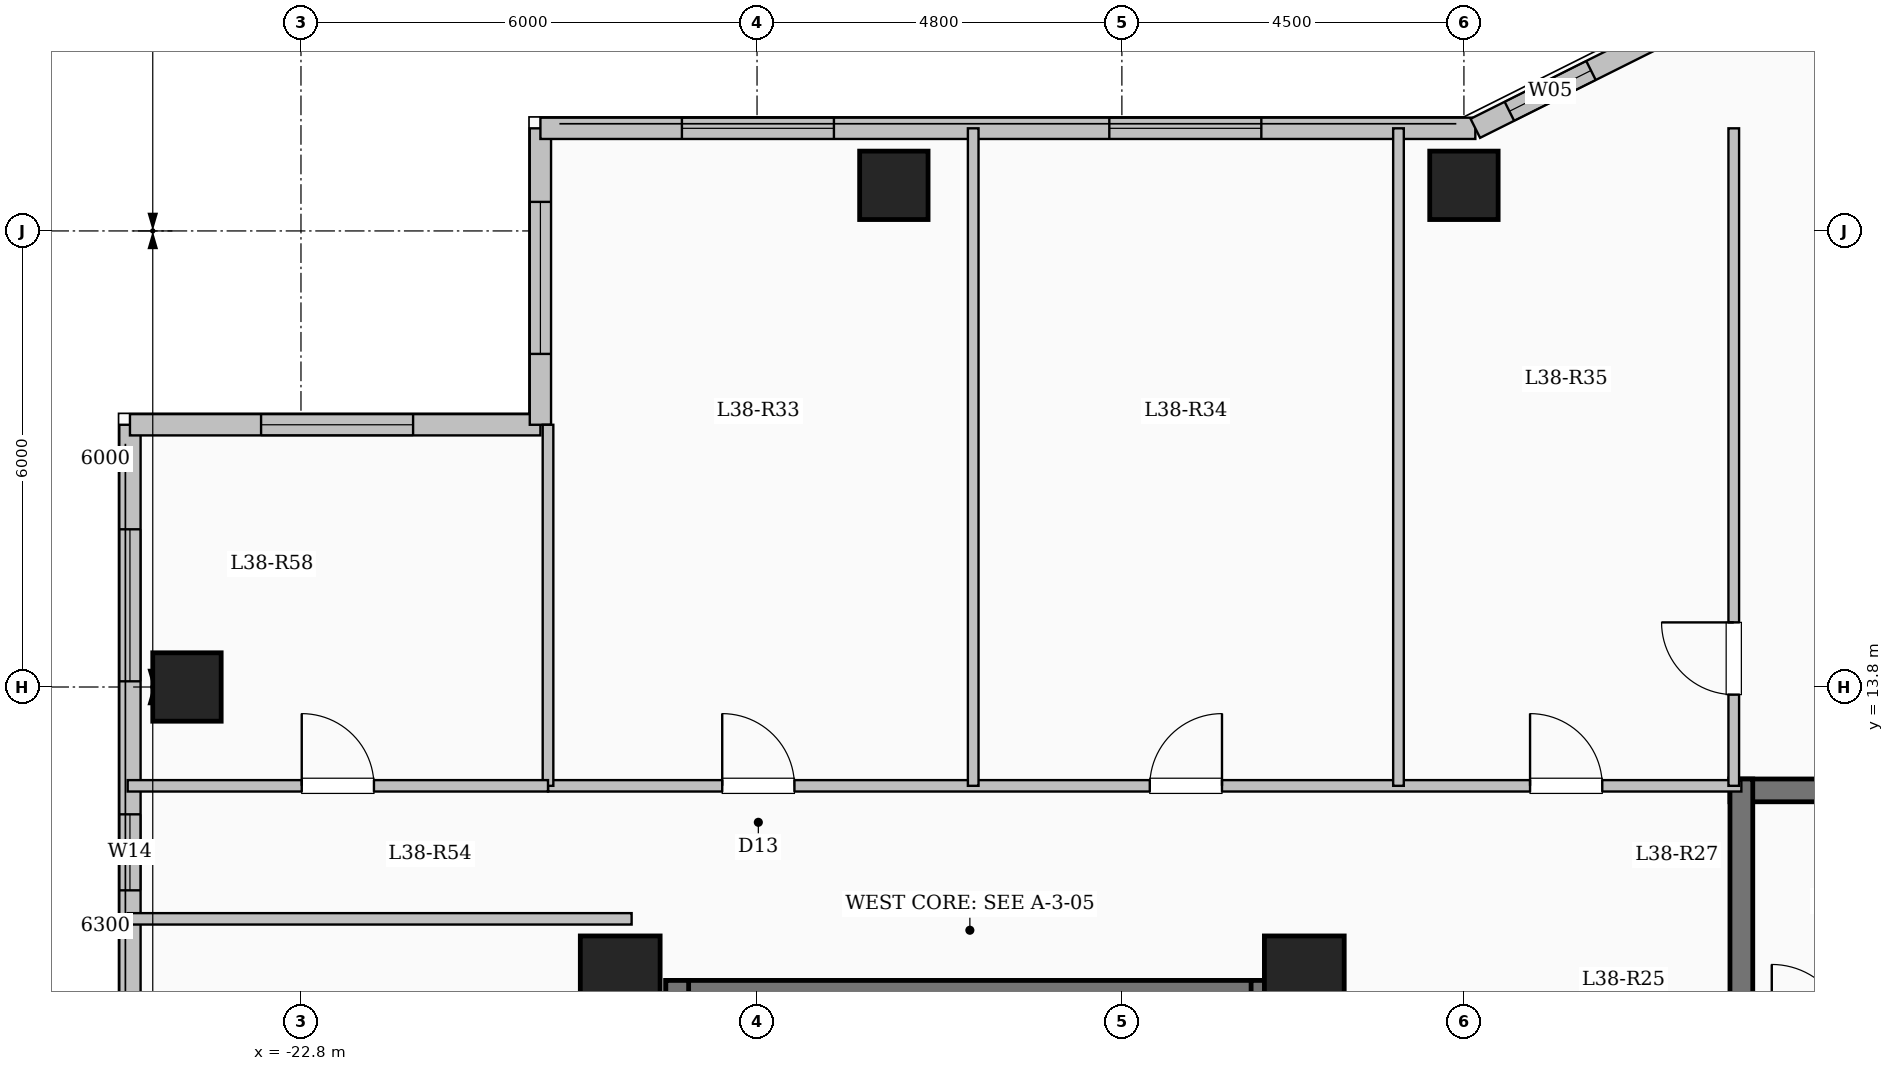
"""IFC4 building model, lengths in metres.
Left out: names, types, materials, properties, quantities, classifications, styles, units other than length and angle.
Written with IfcOpenShell. Run it as: python <this file> out.ifc"""

import sys

from ifc_helpers import new_model, si_unit, direction, frame, frame_2d, origin, origin_2d, place, context, subcontext, project, spatial, rectangle, extrude, element, fill, save


model = new_model("IFC4")
c1 = context("Model", 3, precision=1e-05, world=origin(), true_north=direction((0.0, 1.0)))
c2 = subcontext(c1, "Body", "Model", "MODEL_VIEW")
j1 = project(units=[si_unit("LENGTHUNIT", "METRE"), si_unit("PLANEANGLEUNIT", "RADIAN")], contexts=[c1])
p1 = place(None, origin())
s1 = spatial("IfcSite", under=j1, at=p1, CompositionType="ELEMENT")
p2 = place(p1, origin())
s2 = spatial("IfcBuilding", under=s1, at=p2, CompositionType="ELEMENT")
p3 = place(p2, frame((0.0, 0.0, 142.65)))
s3 = spatial("IfcBuildingStorey", under=s2, at=p3, CompositionType="ELEMENT", Elevation=142.65)
for number, where, z_axis, x_axis in (
    (1, (-9.6, 10.0, 0.0), (0.0, 0.0, 1.0), (1.0, 0.0, 0.0)),
    (2, (-18.6, 10.0, 0.0), (0.0, 0.0, 1.0), (1.0, 0.0, 0.0)),
):
    element("IfcColumn", number, at=place(p3, frame(where, z_axis=z_axis, x_axis=x_axis)), inside=s3, PredefinedType="COLUMN", context=c2, shape_type="SweptSolid", body=[
        extrude(rectangle(XDim=1.05, YDim=1.05, at=origin_2d()), origin(), (0.0, 0.0, 1.0), 3.35),
    ])
for number, where, z_axis, x_axis in (
    (3, (-15.0, 20.4, 0.0), (0.0, 0.0, 1.0), (1.0, 0.0, 0.0)),
    (4, (-7.5, 20.4, 0.0), (0.0, 0.0, 1.0), (1.0, 0.0, 0.0)),
    (5, (-24.3, 13.8, 0.0), (0.0, 0.0, 1.0), (1.0, 0.0, 0.0)),
):
    element("IfcColumn", number, at=place(p3, frame(where, z_axis=z_axis, x_axis=x_axis)), inside=s3, PredefinedType="COLUMN", context=c2, shape_type="SweptSolid", body=[
        extrude(rectangle(XDim=0.9, YDim=0.9, at=origin_2d()), origin(), (0.0, 0.0, 1.0), 3.35),
    ])
p4 = place(p3, frame((-25.05, -17.25, 0.0), z_axis=(0.0, 0.0, 1.0), x_axis=(0.0, 1.0, 0.0)))
e6 = element("IfcWall", 6, at=p4, inside=s3, PredefinedType="SOLIDWALL", context=c2, shape_type="SweptSolid", body=[
    extrude(rectangle(XDim=34.5, YDim=0.28, at=frame_2d((17.25, 0.0))), origin(), (0.0, 0.0, 1.0), 3.1),
])
p5 = place(p4, frame((2.35, 0.0, 0.9)))
e7 = element("IfcOpeningElement", 7, at=p5, cuts=e6, PredefinedType="OPENING", context=c2, shape_type="SweptSolid", body=[
    extrude(rectangle(XDim=2.2, YDim=1.75, at=frame_2d((1.1, 0.875))), frame((0.0, 0.15, 0.0), z_axis=(0.0, -1.0, 0.0), x_axis=(1.0, 0.0, 0.0)), (0.0, 0.0, 1.0), 0.3),
])
p6 = place(p4, frame((7.742, 0.0, 0.9)))
e8 = element("IfcOpeningElement", 8, at=p6, cuts=e6, PredefinedType="OPENING", context=c2, shape_type="SweptSolid", body=[
    extrude(rectangle(XDim=1.5, YDim=1.65, at=frame_2d((0.75, 0.825))), frame((0.0, 0.15, 0.0), z_axis=(0.0, -1.0, 0.0), x_axis=(1.0, 0.0, 0.0)), (0.0, 0.0, 1.0), 0.3),
])
p7 = place(p4, frame((18.0, 0.0, 0.9)))
e9 = element("IfcOpeningElement", 9, at=p7, cuts=e6, PredefinedType="OPENING", context=c2, shape_type="SweptSolid", body=[
    extrude(rectangle(XDim=2.0, YDim=1.7, at=frame_2d((1.0, 0.85))), frame((0.0, 0.15, 0.0), z_axis=(0.0, -1.0, 0.0), x_axis=(1.0, 0.0, 0.0)), (0.0, 0.0, 1.0), 0.3),
])
p8 = place(p4, frame((28.375, 0.0, 0.95)))
e10 = element("IfcOpeningElement", 10, at=p8, cuts=e6, PredefinedType="OPENING", context=c2, shape_type="SweptSolid", body=[
    extrude(rectangle(XDim=1.0, YDim=1.5, at=frame_2d((0.5, 0.75))), frame((0.0, 0.15, 0.0), z_axis=(0.0, -1.0, 0.0), x_axis=(1.0, 0.0, 0.0)), (0.0, 0.0, 1.0), 0.3),
])
p9 = place(p4, frame((31.125, 0.0, 0.9)))
e11 = element("IfcOpeningElement", 11, at=p9, cuts=e6, PredefinedType="OPENING", context=c2, shape_type="SweptSolid", body=[
    extrude(rectangle(XDim=2.0, YDim=1.7, at=frame_2d((1.0, 0.85))), frame((0.0, 0.15, 0.0), z_axis=(0.0, -1.0, 0.0), x_axis=(1.0, 0.0, 0.0)), (0.0, 0.0, 1.0), 0.3),
])
p10 = place(p3, frame((-25.05, 17.25, 0.0), z_axis=(0.0, 0.0, 1.0), x_axis=(1.0, 0.0, 0.0)))
e12 = element("IfcWall", 12, at=p10, inside=s3, PredefinedType="SOLIDWALL", context=c2, shape_type="SweptSolid", body=[
    extrude(rectangle(XDim=5.4, YDim=0.28, at=frame_2d((2.7, 0.0))), origin(), (0.0, 0.0, 1.0), 3.1),
])
p11 = place(p10, frame((1.725, 0.0, 0.9)))
e13 = element("IfcOpeningElement", 13, at=p11, cuts=e12, PredefinedType="OPENING", context=c2, shape_type="SweptSolid", body=[
    extrude(rectangle(XDim=2.0, YDim=1.7, at=frame_2d((1.0, 0.85))), frame((0.0, 0.15, 0.0), z_axis=(0.0, -1.0, 0.0), x_axis=(1.0, 0.0, 0.0)), (0.0, 0.0, 1.0), 0.3),
])
p12 = place(p3, frame((-19.65, 17.25, 0.0), z_axis=(0.0, 0.0, 1.0), x_axis=(0.0, 1.0, 0.0)))
e14 = element("IfcWall", 14, at=p12, inside=s3, PredefinedType="SOLIDWALL", context=c2, shape_type="SweptSolid", body=[
    extrude(rectangle(XDim=3.9, YDim=0.28, at=frame_2d((1.95, 0.0))), origin(), (0.0, 0.0, 1.0), 3.1),
])
p13 = place(p12, frame((0.932, 0.0, 0.9)))
e15 = element("IfcOpeningElement", 15, at=p13, cuts=e14, PredefinedType="OPENING", context=c2, shape_type="SweptSolid", body=[
    extrude(rectangle(XDim=2.0, YDim=1.7, at=frame_2d((1.0, 0.85))), frame((0.0, 0.15, 0.0), z_axis=(0.0, -1.0, 0.0), x_axis=(1.0, 0.0, 0.0)), (0.0, 0.0, 1.0), 0.3),
])
p14 = place(p3, frame((-19.65, 21.15, 0.0), z_axis=(0.0, 0.0, 1.0), x_axis=(1.0, 0.0, 0.0)))
e16 = element("IfcWall", 16, at=p14, inside=s3, PredefinedType="SOLIDWALL", context=c2, shape_type="SweptSolid", body=[
    extrude(rectangle(XDim=12.3, YDim=0.28, at=frame_2d((6.15, 0.0))), origin(), (0.0, 0.0, 1.0), 3.1),
])
p15 = place(p14, frame((1.862, 0.0, 0.9)))
e17 = element("IfcOpeningElement", 17, at=p15, cuts=e16, PredefinedType="OPENING", context=c2, shape_type="SweptSolid", body=[
    extrude(rectangle(XDim=2.0, YDim=1.7, at=frame_2d((1.0, 0.85))), frame((0.0, 0.15, 0.0), z_axis=(0.0, -1.0, 0.0), x_axis=(1.0, 0.0, 0.0)), (0.0, 0.0, 1.0), 0.3),
])
p16 = place(p14, frame((7.485, 0.0, 0.9)))
e18 = element("IfcOpeningElement", 18, at=p16, cuts=e16, PredefinedType="OPENING", context=c2, shape_type="SweptSolid", body=[
    extrude(rectangle(XDim=2.0, YDim=1.7, at=frame_2d((1.0, 0.85))), frame((0.0, 0.15, 0.0), z_axis=(0.0, -1.0, 0.0), x_axis=(1.0, 0.0, 0.0)), (0.0, 0.0, 1.0), 0.3),
])
p17 = place(p3, frame((-7.35, 21.15, 0.0), z_axis=(0.0, 0.0, 1.0), x_axis=(0.894427191, 0.4472135955, 0.0)))
e19 = element("IfcWall", 19, at=p17, inside=s3, PredefinedType="SOLIDWALL", context=c2, shape_type="SweptSolid", body=[
    extrude(rectangle(XDim=3.354, YDim=0.28, at=frame_2d((1.677, 0.0))), origin(), (0.0, 0.0, 1.0), 3.1),
])
p18 = place(p17, frame((0.501, 0.0, 0.95)))
e20 = element("IfcOpeningElement", 20, at=p18, cuts=e19, PredefinedType="OPENING", context=c2, shape_type="SweptSolid", body=[
    extrude(rectangle(XDim=1.2, YDim=1.5, at=frame_2d((0.6, 0.75))), frame((0.0, 0.15, 0.0), z_axis=(0.0, -1.0, 0.0), x_axis=(1.0, 0.0, 0.0)), (0.0, 0.0, 1.0), 0.3),
])
p19 = place(p3, frame((-18.0, 9.79, 0.0), z_axis=(0.0, 0.0, 1.0), x_axis=(1.0, 0.0, 0.0)))
e21 = element("IfcWall", 21, at=p19, inside=s3, PredefinedType="SHEAR", context=c2, shape_type="SweptSolid", body=[
    extrude(rectangle(XDim=8.0, YDim=0.3, at=frame_2d((4.0, 0.0))), origin(), (0.0, 0.0, 1.0), 3.35),
])
for number, where, z_axis, x_axis in (
    (22, (-17.85, 6.35, 0.0), (0.0, 0.0, 1.0), (0.0, 1.0, 0.0)),
    (23, (-10.15, 6.35, 0.0), (0.0, 0.0, 1.0), (0.0, 1.0, 0.0)),
):
    element("IfcWall", number, at=place(p3, frame(where, z_axis=z_axis, x_axis=x_axis)), inside=s3, PredefinedType="SHEAR", context=c2, shape_type="SweptSolid", body=[
        extrude(rectangle(XDim=3.59, YDim=0.3, at=frame_2d((1.795, 0.0))), origin(), (0.0, 0.0, 1.0), 3.35),
    ])
p20 = place(p3, frame((-4.0, 12.44, 0.0), z_axis=(0.0, 0.0, 1.0), x_axis=(1.0, 0.0, 0.0)))
e24 = element("IfcWall", 24, at=p20, inside=s3, PredefinedType="SHEAR", context=c2, shape_type="SweptSolid", body=[
    extrude(rectangle(XDim=8.0, YDim=0.3, at=frame_2d((4.0, 0.0))), origin(), (0.0, 0.0, 1.0), 3.35),
])
p21 = place(p3, frame((-3.85, 9.0, 0.0), z_axis=(0.0, 0.0, 1.0), x_axis=(0.0, 1.0, 0.0)))
e25 = element("IfcWall", 25, at=p21, inside=s3, PredefinedType="SHEAR", context=c2, shape_type="SweptSolid", body=[
    extrude(rectangle(XDim=3.59, YDim=0.3, at=frame_2d((1.795, 0.0))), origin(), (0.0, 0.0, 1.0), 3.35),
])
p22 = place(p3, frame((-19.55, 12.5, 0.0), z_axis=(0.0, 0.0, 1.0), x_axis=(1.0, 0.0, 0.0)))
e26 = element("IfcWall", 26, at=p22, inside=s3, PredefinedType="PARTITIONING", context=c2, shape_type="SweptSolid", body=[
    extrude(rectangle(XDim=15.7, YDim=0.15, at=frame_2d((7.85, 0.0))), origin(), (0.0, 0.0, 1.0), 3.1),
])
p23 = place(p22, frame((2.292, 0.0, 0.0)))
e27 = element("IfcOpeningElement", 27, at=p23, cuts=e26, PredefinedType="OPENING", context=c2, shape_type="SweptSolid", body=[
    extrude(rectangle(XDim=0.95, YDim=2.15, at=frame_2d((0.475, 1.075))), frame((0.0, 0.085, 0.0), z_axis=(0.0, -1.0, 0.0), x_axis=(1.0, 0.0, 0.0)), (0.0, 0.0, 1.0), 0.17),
])
p24 = place(p22, frame((7.917, 0.0, 0.0)))
e28 = element("IfcOpeningElement", 28, at=p24, cuts=e26, PredefinedType="OPENING", context=c2, shape_type="SweptSolid", body=[
    extrude(rectangle(XDim=0.95, YDim=2.15, at=frame_2d((0.475, 1.075))), frame((0.0, 0.085, 0.0), z_axis=(0.0, -1.0, 0.0), x_axis=(1.0, 0.0, 0.0)), (0.0, 0.0, 1.0), 0.17),
])
p25 = place(p22, frame((12.92, 0.0, 0.0)))
e29 = element("IfcOpeningElement", 29, at=p25, cuts=e26, PredefinedType="OPENING", context=c2, shape_type="SweptSolid", body=[
    extrude(rectangle(XDim=0.95, YDim=2.15, at=frame_2d((0.475, 1.075))), frame((0.0, 0.085, 0.0), z_axis=(0.0, -1.0, 0.0), x_axis=(1.0, 0.0, 0.0)), (0.0, 0.0, 1.0), 0.17),
])
p26 = place(p3, frame((-3.95, 12.5, 0.0), z_axis=(0.0, 0.0, 1.0), x_axis=(0.0, 1.0, 0.0)))
e30 = element("IfcWall", 30, at=p26, inside=s3, PredefinedType="PARTITIONING", context=c2, shape_type="SweptSolid", body=[
    extrude(rectangle(XDim=8.65, YDim=0.14, at=frame_2d((4.325, 0.0))), origin(), (0.0, 0.0, 1.0), 3.1),
])
p27 = place(p26, frame((1.2, 0.0, 0.0)))
e31 = element("IfcOpeningElement", 31, at=p27, cuts=e30, PredefinedType="OPENING", context=c2, shape_type="SweptSolid", body=[
    extrude(rectangle(XDim=0.95, YDim=2.15, at=frame_2d((0.475, 1.075))), frame((0.0, 0.08, 0.0), z_axis=(0.0, -1.0, 0.0), x_axis=(1.0, 0.0, 0.0)), (0.0, 0.0, 1.0), 0.16),
])
for number, where, z_axis, x_axis in (
    (32, (-13.956, 12.5, 0.0), (0.0, 0.0, 1.0), (0.0, 1.0, 0.0)),
    (33, (-8.361, 12.5, 0.0), (0.0, 0.0, 1.0), (0.0, 1.0, 0.0)),
):
    element("IfcWall", number, at=place(p3, frame(where, z_axis=z_axis, x_axis=x_axis)), inside=s3, PredefinedType="PARTITIONING", context=c2, shape_type="SweptSolid", body=[
        extrude(rectangle(XDim=8.65, YDim=0.14, at=frame_2d((4.325, 0.0))), origin(), (0.0, 0.0, 1.0), 3.1),
    ])
p28 = place(p3, frame((-25.08, 10.75, 0.0), z_axis=(0.0, 0.0, 1.0), x_axis=(1.0, 0.0, 0.0)))
e34 = element("IfcWall", 34, at=p28, inside=s3, PredefinedType="PARTITIONING", context=c2, shape_type="SweptSolid", body=[
    extrude(rectangle(XDim=6.63, YDim=0.15, at=frame_2d((3.315, 0.0))), origin(), (0.0, 0.0, 1.0), 3.1),
])
p29 = place(p3, frame((-19.55, 12.5, 0.0), z_axis=(0.0, 0.0, 1.0), x_axis=(0.0, 1.0, 0.0)))
e35 = element("IfcWall", 35, at=p29, inside=s3, PredefinedType="PARTITIONING", context=c2, shape_type="SweptSolid", body=[
    extrude(rectangle(XDim=4.75, YDim=0.14, at=frame_2d((2.375, 0.0))), origin(), (0.0, 0.0, 1.0), 3.1),
])
p30 = place(p3, frame((-25.08, 12.5, 0.0), z_axis=(0.0, 0.0, 1.0), x_axis=(1.0, 0.0, 0.0)))
e36 = element("IfcWall", 36, at=p30, inside=s3, PredefinedType="PARTITIONING", context=c2, shape_type="SweptSolid", body=[
    extrude(rectangle(XDim=5.53, YDim=0.15, at=frame_2d((2.765, 0.0))), origin(), (0.0, 0.0, 1.0), 3.1),
])
p31 = place(p30, frame((2.29, 0.0, 0.0)))
e37 = element("IfcOpeningElement", 37, at=p31, cuts=e36, PredefinedType="OPENING", context=c2, shape_type="SweptSolid", body=[
    extrude(rectangle(XDim=0.95, YDim=2.15, at=frame_2d((0.475, 1.075))), frame((0.0, 0.085, 0.0), z_axis=(0.0, -1.0, 0.0), x_axis=(1.0, 0.0, 0.0)), (0.0, 0.0, 1.0), 0.17),
])
p32 = place(p8, origin())
e38 = element("IfcWindow", 38, at=p32, inside=s3, PartitioningType="SINGLE_PANEL", PredefinedType="WINDOW", context=c2, shape_type="SweptSolid", body=[
    extrude(rectangle(XDim=1.0, YDim=1.5, at=frame_2d((0.5, 0.75))), frame((0.0, 0.03, 0.0), z_axis=(0.0, -1.0, 0.0), x_axis=(1.0, 0.0, 0.0)), (0.0, 0.0, 1.0), 0.06),
])
fill(e10, e38)
p33 = place(p9, origin())
e39 = element("IfcWindow", 39, at=p33, inside=s3, PartitioningType="SINGLE_PANEL", PredefinedType="WINDOW", context=c2, shape_type="SweptSolid", body=[
    extrude(rectangle(XDim=2.0, YDim=1.7, at=frame_2d((1.0, 0.85))), frame((0.0, 0.03, 0.0), z_axis=(0.0, -1.0, 0.0), x_axis=(1.0, 0.0, 0.0)), (0.0, 0.0, 1.0), 0.06),
])
fill(e11, e39)
p34 = place(p11, origin())
e40 = element("IfcWindow", 40, at=p34, inside=s3, PartitioningType="SINGLE_PANEL", PredefinedType="WINDOW", context=c2, shape_type="SweptSolid", body=[
    extrude(rectangle(XDim=2.0, YDim=1.7, at=frame_2d((1.0, 0.85))), frame((0.0, 0.03, 0.0), z_axis=(0.0, -1.0, 0.0), x_axis=(1.0, 0.0, 0.0)), (0.0, 0.0, 1.0), 0.06),
])
fill(e13, e40)
p35 = place(p13, origin())
e41 = element("IfcWindow", 41, at=p35, inside=s3, PartitioningType="SINGLE_PANEL", PredefinedType="WINDOW", context=c2, shape_type="SweptSolid", body=[
    extrude(rectangle(XDim=2.0, YDim=1.7, at=frame_2d((1.0, 0.85))), frame((0.0, 0.03, 0.0), z_axis=(0.0, -1.0, 0.0), x_axis=(1.0, 0.0, 0.0)), (0.0, 0.0, 1.0), 0.06),
])
fill(e15, e41)
p36 = place(p15, origin())
e42 = element("IfcWindow", 42, at=p36, inside=s3, PartitioningType="SINGLE_PANEL", PredefinedType="WINDOW", context=c2, shape_type="SweptSolid", body=[
    extrude(rectangle(XDim=2.0, YDim=1.7, at=frame_2d((1.0, 0.85))), frame((0.0, 0.03, 0.0), z_axis=(0.0, -1.0, 0.0), x_axis=(1.0, 0.0, 0.0)), (0.0, 0.0, 1.0), 0.06),
])
fill(e17, e42)
p37 = place(p16, origin())
e43 = element("IfcWindow", 43, at=p37, inside=s3, PartitioningType="SINGLE_PANEL", PredefinedType="WINDOW", context=c2, shape_type="SweptSolid", body=[
    extrude(rectangle(XDim=2.0, YDim=1.7, at=frame_2d((1.0, 0.85))), frame((0.0, 0.03, 0.0), z_axis=(0.0, -1.0, 0.0), x_axis=(1.0, 0.0, 0.0)), (0.0, 0.0, 1.0), 0.06),
])
fill(e18, e43)
p38 = place(p18, origin())
e44 = element("IfcWindow", 44, at=p38, inside=s3, PartitioningType="SINGLE_PANEL", PredefinedType="WINDOW", context=c2, shape_type="SweptSolid", body=[
    extrude(rectangle(XDim=1.2, YDim=1.5, at=frame_2d((0.6, 0.75))), frame((0.0, 0.03, 0.0), z_axis=(0.0, -1.0, 0.0), x_axis=(1.0, 0.0, 0.0)), (0.0, 0.0, 1.0), 0.06),
])
fill(e20, e44)
p39 = place(p23, origin())
e45 = element("IfcDoor", 45, at=p39, inside=s3, OperationType="SINGLE_SWING_LEFT", PredefinedType="DOOR", context=c2, shape_type="SweptSolid", body=[
    extrude(rectangle(XDim=0.95, YDim=2.15, at=frame_2d((0.475, 1.075))), frame((0.0, 0.025, 0.0), z_axis=(0.0, -1.0, 0.0), x_axis=(1.0, 0.0, 0.0)), (0.0, 0.0, 1.0), 0.05),
])
fill(e27, e45)
p40 = place(p24, origin())
e46 = element("IfcDoor", 46, at=p40, inside=s3, OperationType="SINGLE_SWING_RIGHT", PredefinedType="DOOR", context=c2, shape_type="SweptSolid", body=[
    extrude(rectangle(XDim=0.95, YDim=2.15, at=frame_2d((0.475, 1.075))), frame((0.0, 0.025, 0.0), z_axis=(0.0, -1.0, 0.0), x_axis=(1.0, 0.0, 0.0)), (0.0, 0.0, 1.0), 0.05),
])
fill(e28, e46)
p41 = place(p25, origin())
e47 = element("IfcDoor", 47, at=p41, inside=s3, OperationType="SINGLE_SWING_LEFT", PredefinedType="DOOR", context=c2, shape_type="SweptSolid", body=[
    extrude(rectangle(XDim=0.95, YDim=2.15, at=frame_2d((0.475, 1.075))), frame((0.0, 0.025, 0.0), z_axis=(0.0, -1.0, 0.0), x_axis=(1.0, 0.0, 0.0)), (0.0, 0.0, 1.0), 0.05),
])
fill(e29, e47)
p42 = place(p27, origin())
e48 = element("IfcDoor", 48, at=p42, inside=s3, OperationType="SINGLE_SWING_RIGHT", PredefinedType="DOOR", context=c2, shape_type="SweptSolid", body=[
    extrude(rectangle(XDim=0.95, YDim=2.15, at=frame_2d((0.475, 1.075))), frame((0.0, 0.025, 0.0), z_axis=(0.0, -1.0, 0.0), x_axis=(1.0, 0.0, 0.0)), (0.0, 0.0, 1.0), 0.05),
])
fill(e31, e48)
p43 = place(p31, origin())
e49 = element("IfcDoor", 49, at=p43, inside=s3, OperationType="SINGLE_SWING_LEFT", PredefinedType="DOOR", context=c2, shape_type="SweptSolid", body=[
    extrude(rectangle(XDim=0.95, YDim=2.15, at=frame_2d((0.475, 1.075))), frame((0.0, 0.025, 0.0), z_axis=(0.0, -1.0, 0.0), x_axis=(1.0, 0.0, 0.0)), (0.0, 0.0, 1.0), 0.05),
])
fill(e37, e49)
save(model, sys.argv[1])
